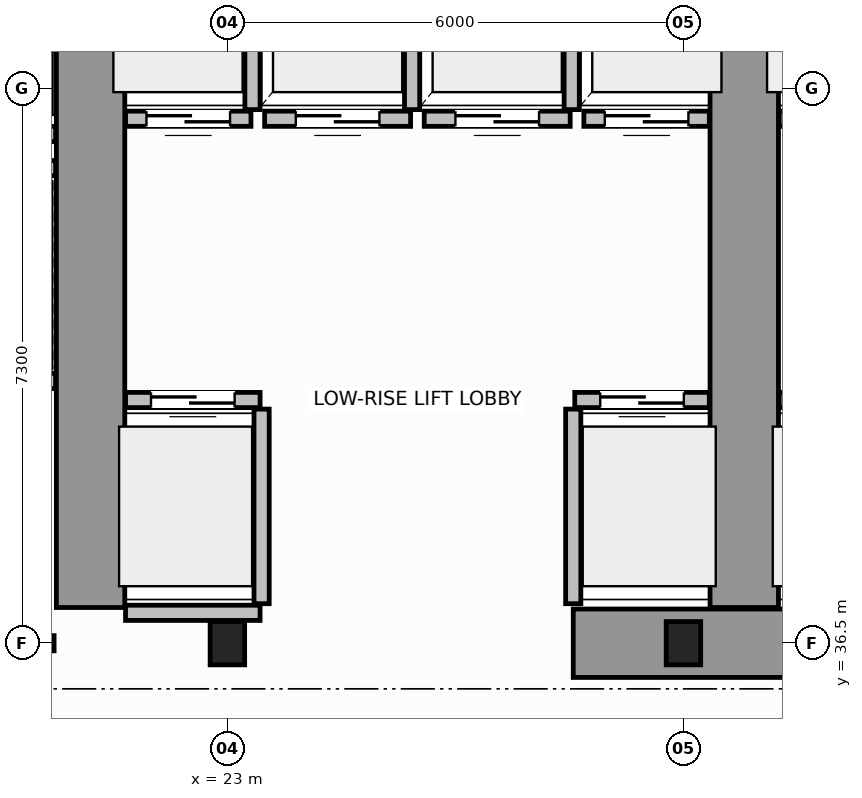
"""IFC4 building model, lengths in metres.
Left out: names, types, materials, properties, quantities, classifications, styles, units other than length and angle.
Written with IfcOpenShell. Run it as: python <this file> out.ifc"""

import sys

from ifc_helpers import new_model, si_unit, direction, frame, frame_2d, origin, origin_2d, place, context, subcontext, project, spatial, rectangle, i_section, extrude, source, transform, mapped, element, fill, save


model = new_model("IFC4")
c1 = context("Model", 3, precision=1e-05, world=origin(), true_north=direction((0.0, 1.0)))
c2 = subcontext(c1, "Body", "Model", "MODEL_VIEW")
j1 = project(units=[si_unit("LENGTHUNIT", "METRE"), si_unit("PLANEANGLEUNIT", "RADIAN")], contexts=[c1])
p1 = place(None, origin())
s1 = spatial("IfcSite", under=j1, at=p1, CompositionType="ELEMENT")
p2 = place(p1, origin())
s2 = spatial("IfcBuilding", under=s1, at=p2, CompositionType="ELEMENT")
p3 = place(p2, origin())
s3 = spatial("IfcBuildingStorey", under=s2, at=p3, CompositionType="ELEMENT", Elevation=0.0)
m1 = source(origin(), c2, "Body", "SweptSolid", [
    extrude(i_section(OverallWidth=0.454, OverallDepth=0.569, WebThickness=0.078, FlangeThickness=0.08, FilletRadius=0.015, at=origin_2d()), origin(), (0.0, 0.0, 1.0), 5.6),
])
for number, where, z_axis, x_axis in (
    (1, (23.0, 36.5, 0.0), (0.0, 0.0, 1.0), (1.0, 0.0, 0.0)),
    (2, (29.0, 36.5, 0.0), (0.0, 0.0, 1.0), (1.0, 0.0, 0.0)),
):
    element("IfcColumn", number, at=place(p3, frame(where, z_axis=z_axis, x_axis=x_axis)), inside=s3, PredefinedType="COLUMN", context=c2, shape_type="MappedRepresentation", body=[
        mapped(m1, transform((0.0, 0.0, 0.0), scale=1.0)),
    ])
p4 = place(p3, frame((27.55, 36.5, 0.0), z_axis=(0.0, 0.0, 1.0), x_axis=(1.0, 0.0, 0.0)))
e3 = element("IfcWall", 3, at=p4, inside=s3, PredefinedType="SHEAR", context=c2, shape_type="SweptSolid", body=[
    extrude(rectangle(XDim=4.5, YDim=0.9, at=frame_2d((2.25, 0.0))), origin(), (0.0, 0.0, 1.0), 5.6),
])
for number, where, z_axis, x_axis in (
    (4, (21.2, 36.97, 0.0), (0.0, 0.0, 1.0), (0.0, 1.0, 0.0)),
    (5, (29.8, 36.97, 0.0), (0.0, 0.0, 1.0), (0.0, 1.0, 0.0)),
):
    element("IfcWall", number, at=place(p3, frame(where, z_axis=z_axis, x_axis=x_axis)), inside=s3, PredefinedType="SHEAR", context=c2, shape_type="SweptSolid", body=[
        extrude(rectangle(XDim=9.23, YDim=0.9, at=frame_2d((4.615, 0.0))), origin(), (0.0, 0.0, 1.0), 5.6),
    ])
p5 = place(p3, frame((18.25, 36.5, 0.0), z_axis=(0.0, 0.0, 1.0), x_axis=(1.0, 0.0, 0.0)))
e6 = element("IfcWall", 6, at=p5, inside=s3, PredefinedType="SOLIDWALL", context=c2, shape_type="SweptSolid", body=[
    extrude(rectangle(XDim=2.47, YDim=0.2, at=frame_2d((1.235, 0.0))), origin(), (0.0, 0.0, 1.0), 4.11),
])
p6 = place(p5, frame((0.65, 0.0, 0.0)))
e7 = element("IfcOpeningElement", 7, at=p6, cuts=e6, PredefinedType="OPENING", context=c2, shape_type="SweptSolid", body=[
    extrude(rectangle(XDim=1.1, YDim=2.15, at=frame_2d((0.55, 1.075))), frame((0.0, 0.11, 0.0), z_axis=(0.0, -1.0, 0.0), x_axis=(1.0, 0.0, 0.0)), (0.0, 0.0, 1.0), 0.22),
])
p7 = place(p3, frame((21.66, 39.7, 0.0), z_axis=(0.0, 0.0, 1.0), x_axis=(1.0, 0.0, 0.0)))
e8 = element("IfcWall", 8, at=p7, inside=s3, PredefinedType="SOLIDWALL", context=c2, shape_type="SweptSolid", body=[
    extrude(rectangle(XDim=1.77, YDim=0.2, at=frame_2d((0.885, 0.0))), origin(), (0.0, 0.0, 1.0), 5.32),
])
p8 = place(p7, frame((0.335, 0.0, 0.0)))
e9 = element("IfcOpeningElement", 9, at=p8, cuts=e8, PredefinedType="OPENING", context=c2, shape_type="SweptSolid", body=[
    extrude(rectangle(XDim=1.1, YDim=2.15, at=frame_2d((0.55, 1.075))), frame((0.0, 0.11, 0.0), z_axis=(0.0, -1.0, 0.0), x_axis=(1.0, 0.0, 0.0)), (0.0, 0.0, 1.0), 0.22),
])
p9 = place(p3, frame((21.66, 36.9, 0.0), z_axis=(0.0, 0.0, 1.0), x_axis=(1.0, 0.0, 0.0)))
e10 = element("IfcWall", 10, at=p9, inside=s3, PredefinedType="SOLIDWALL", context=c2, shape_type="SweptSolid", body=[
    extrude(rectangle(XDim=1.77, YDim=0.2, at=frame_2d((0.885, 0.0))), origin(), (0.0, 0.0, 1.0), 4.11),
])
p10 = place(p3, frame((23.45, 37.02, 0.0), z_axis=(0.0, 0.0, 1.0), x_axis=(0.0, 1.0, 0.0)))
e11 = element("IfcWall", 11, at=p10, inside=s3, PredefinedType="SOLIDWALL", context=c2, shape_type="SweptSolid", body=[
    extrude(rectangle(XDim=2.56, YDim=0.2, at=frame_2d((1.28, 0.0))), origin(), (0.0, 0.0, 1.0), 5.32),
])
p11 = place(p3, frame((27.57, 39.7, 0.0), z_axis=(0.0, 0.0, 1.0), x_axis=(1.0, 0.0, 0.0)))
e12 = element("IfcWall", 12, at=p11, inside=s3, PredefinedType="SOLIDWALL", context=c2, shape_type="SweptSolid", body=[
    extrude(rectangle(XDim=1.77, YDim=0.2, at=frame_2d((0.885, 0.0))), origin(), (0.0, 0.0, 1.0), 5.32),
])
p12 = place(p11, frame((0.335, 0.0, 0.0)))
e13 = element("IfcOpeningElement", 13, at=p12, cuts=e12, PredefinedType="OPENING", context=c2, shape_type="SweptSolid", body=[
    extrude(rectangle(XDim=1.1, YDim=2.15, at=frame_2d((0.55, 1.075))), frame((0.0, 0.11, 0.0), z_axis=(0.0, -1.0, 0.0), x_axis=(1.0, 0.0, 0.0)), (0.0, 0.0, 1.0), 0.22),
])
p13 = place(p3, frame((27.55, 37.02, 0.0), z_axis=(0.0, 0.0, 1.0), x_axis=(0.0, 1.0, 0.0)))
e14 = element("IfcWall", 14, at=p13, inside=s3, PredefinedType="SOLIDWALL", context=c2, shape_type="SweptSolid", body=[
    extrude(rectangle(XDim=2.56, YDim=0.2, at=frame_2d((1.28, 0.0))), origin(), (0.0, 0.0, 1.0), 5.32),
])
p14 = place(p3, frame((21.66, 43.4, 0.0), z_axis=(0.0, 0.0, 1.0), x_axis=(1.0, 0.0, 0.0)))
e15 = element("IfcWall", 15, at=p14, inside=s3, PredefinedType="SOLIDWALL", context=c2, shape_type="SweptSolid", body=[
    extrude(rectangle(XDim=1.65, YDim=0.2, at=frame_2d((0.825, 0.0))), origin(), (0.0, 0.0, 1.0), 5.32),
])
p15 = place(p14, frame((0.275, 0.0, 0.0)))
e16 = element("IfcOpeningElement", 16, at=p15, cuts=e15, PredefinedType="OPENING", context=c2, shape_type="SweptSolid", body=[
    extrude(rectangle(XDim=1.1, YDim=2.15, at=frame_2d((0.55, 1.075))), frame((0.0, 0.11, 0.0), z_axis=(0.0, -1.0, 0.0), x_axis=(1.0, 0.0, 0.0)), (0.0, 0.0, 1.0), 0.22),
])
p16 = place(p3, frame((23.33, 43.52, 0.0), z_axis=(0.0, 0.0, 1.0), x_axis=(0.0, 1.0, 0.0)))
e17 = element("IfcWall", 17, at=p16, inside=s3, PredefinedType="SOLIDWALL", context=c2, shape_type="SweptSolid", body=[
    extrude(rectangle(XDim=2.56, YDim=0.2, at=frame_2d((1.28, 0.0))), origin(), (0.0, 0.0, 1.0), 5.32),
])
p17 = place(p3, frame((23.49, 43.4, 0.0), z_axis=(0.0, 0.0, 1.0), x_axis=(1.0, 0.0, 0.0)))
e18 = element("IfcWall", 18, at=p17, inside=s3, PredefinedType="SOLIDWALL", context=c2, shape_type="SweptSolid", body=[
    extrude(rectangle(XDim=1.92, YDim=0.2, at=frame_2d((0.96, 0.0))), origin(), (0.0, 0.0, 1.0), 5.32),
])
p18 = place(p17, frame((0.41, 0.0, 0.0)))
e19 = element("IfcOpeningElement", 19, at=p18, cuts=e18, PredefinedType="OPENING", context=c2, shape_type="SweptSolid", body=[
    extrude(rectangle(XDim=1.1, YDim=2.15, at=frame_2d((0.55, 1.075))), frame((0.0, 0.11, 0.0), z_axis=(0.0, -1.0, 0.0), x_axis=(1.0, 0.0, 0.0)), (0.0, 0.0, 1.0), 0.22),
])
p19 = place(p3, frame((25.43, 43.52, 0.0), z_axis=(0.0, 0.0, 1.0), x_axis=(0.0, 1.0, 0.0)))
e20 = element("IfcWall", 20, at=p19, inside=s3, PredefinedType="SOLIDWALL", context=c2, shape_type="SweptSolid", body=[
    extrude(rectangle(XDim=2.56, YDim=0.2, at=frame_2d((1.28, 0.0))), origin(), (0.0, 0.0, 1.0), 5.32),
])
p20 = place(p3, frame((25.59, 43.4, 0.0), z_axis=(0.0, 0.0, 1.0), x_axis=(1.0, 0.0, 0.0)))
e21 = element("IfcWall", 21, at=p20, inside=s3, PredefinedType="SOLIDWALL", context=c2, shape_type="SweptSolid", body=[
    extrude(rectangle(XDim=1.92, YDim=0.2, at=frame_2d((0.96, 0.0))), origin(), (0.0, 0.0, 1.0), 5.32),
])
p21 = place(p20, frame((0.41, 0.0, 0.0)))
e22 = element("IfcOpeningElement", 22, at=p21, cuts=e21, PredefinedType="OPENING", context=c2, shape_type="SweptSolid", body=[
    extrude(rectangle(XDim=1.1, YDim=2.15, at=frame_2d((0.55, 1.075))), frame((0.0, 0.11, 0.0), z_axis=(0.0, -1.0, 0.0), x_axis=(1.0, 0.0, 0.0)), (0.0, 0.0, 1.0), 0.22),
])
p22 = place(p3, frame((27.53, 43.52, 0.0), z_axis=(0.0, 0.0, 1.0), x_axis=(0.0, 1.0, 0.0)))
e23 = element("IfcWall", 23, at=p22, inside=s3, PredefinedType="SOLIDWALL", context=c2, shape_type="SweptSolid", body=[
    extrude(rectangle(XDim=2.56, YDim=0.2, at=frame_2d((1.28, 0.0))), origin(), (0.0, 0.0, 1.0), 5.32),
])
p23 = place(p3, frame((27.69, 43.4, 0.0), z_axis=(0.0, 0.0, 1.0), x_axis=(1.0, 0.0, 0.0)))
e24 = element("IfcWall", 24, at=p23, inside=s3, PredefinedType="SOLIDWALL", context=c2, shape_type="SweptSolid", body=[
    extrude(rectangle(XDim=1.65, YDim=0.2, at=frame_2d((0.825, 0.0))), origin(), (0.0, 0.0, 1.0), 5.32),
])
p24 = place(p23, frame((0.275, 0.0, 0.0)))
e25 = element("IfcOpeningElement", 25, at=p24, cuts=e24, PredefinedType="OPENING", context=c2, shape_type="SweptSolid", body=[
    extrude(rectangle(XDim=1.1, YDim=2.15, at=frame_2d((0.55, 1.075))), frame((0.0, 0.11, 0.0), z_axis=(0.0, -1.0, 0.0), x_axis=(1.0, 0.0, 0.0)), (0.0, 0.0, 1.0), 0.22),
])
p25 = place(p3, frame((30.26, 39.7, 0.0), z_axis=(0.0, 0.0, 1.0), x_axis=(1.0, 0.0, 0.0)))
e26 = element("IfcWall", 26, at=p25, inside=s3, PredefinedType="SOLIDWALL", context=c2, shape_type="SweptSolid", body=[
    extrude(rectangle(XDim=1.77, YDim=0.2, at=frame_2d((0.885, 0.0))), origin(), (0.0, 0.0, 1.0), 5.32),
])
p26 = place(p25, frame((0.335, 0.0, 0.0)))
e27 = element("IfcOpeningElement", 27, at=p26, cuts=e26, PredefinedType="OPENING", context=c2, shape_type="SweptSolid", body=[
    extrude(rectangle(XDim=1.1, YDim=2.15, at=frame_2d((0.55, 1.075))), frame((0.0, 0.11, 0.0), z_axis=(0.0, -1.0, 0.0), x_axis=(1.0, 0.0, 0.0)), (0.0, 0.0, 1.0), 0.22),
])
p27 = place(p3, frame((30.26, 43.4, 0.0), z_axis=(0.0, 0.0, 1.0), x_axis=(1.0, 0.0, 0.0)))
e28 = element("IfcWall", 28, at=p27, inside=s3, PredefinedType="SOLIDWALL", context=c2, shape_type="SweptSolid", body=[
    extrude(rectangle(XDim=1.65, YDim=0.2, at=frame_2d((0.825, 0.0))), origin(), (0.0, 0.0, 1.0), 5.32),
])
p28 = place(p27, frame((0.275, 0.0, 0.0)))
e29 = element("IfcOpeningElement", 29, at=p28, cuts=e28, PredefinedType="OPENING", context=c2, shape_type="SweptSolid", body=[
    extrude(rectangle(XDim=1.1, YDim=2.15, at=frame_2d((0.55, 1.075))), frame((0.0, 0.11, 0.0), z_axis=(0.0, -1.0, 0.0), x_axis=(1.0, 0.0, 0.0)), (0.0, 0.0, 1.0), 0.22),
])
p29 = place(p3, frame((18.67, 43.2, 0.0), z_axis=(0.0, 0.0, 1.0), x_axis=(1.0, 0.0, 0.0)))
e30 = element("IfcWall", 30, at=p29, inside=s3, PredefinedType="SOLIDWALL", context=c2, shape_type="SweptSolid", body=[
    extrude(rectangle(XDim=2.07, YDim=0.2, at=frame_2d((1.035, 0.0))), origin(), (0.0, 0.0, 1.0), 5.32),
])
p30 = place(p3, frame((18.67, 39.95, 0.0), z_axis=(0.0, 0.0, 1.0), x_axis=(1.0, 0.0, 0.0)))
e31 = element("IfcWall", 31, at=p30, inside=s3, PredefinedType="SOLIDWALL", context=c2, shape_type="SweptSolid", body=[
    extrude(rectangle(XDim=2.07, YDim=0.2, at=frame_2d((1.035, 0.0))), origin(), (0.0, 0.0, 1.0), 5.32),
])
p31 = place(p30, frame((0.485, 0.0, 0.0)))
e32 = element("IfcOpeningElement", 32, at=p31, cuts=e31, PredefinedType="OPENING", context=c2, shape_type="SweptSolid", body=[
    extrude(rectangle(XDim=1.1, YDim=2.15, at=frame_2d((0.55, 1.075))), frame((0.0, 0.11, 0.0), z_axis=(0.0, -1.0, 0.0), x_axis=(1.0, 0.0, 0.0)), (0.0, 0.0, 1.0), 0.22),
])
p32 = place(p3, frame((18.67, 42.75, 0.0), z_axis=(0.0, 0.0, 1.0), x_axis=(1.0, 0.0, 0.0)))
e33 = element("IfcWall", 33, at=p32, inside=s3, PredefinedType="SOLIDWALL", context=c2, shape_type="SweptSolid", body=[
    extrude(rectangle(XDim=2.07, YDim=0.2, at=frame_2d((1.035, 0.0))), origin(), (0.0, 0.0, 1.0), 5.32),
])
m2 = source(origin(), c2, "Body", "SweptSolid", [
    extrude(rectangle(XDim=1.1, YDim=2.15, at=frame_2d((0.55, 1.075))), frame((0.0, 0.025, 0.0), z_axis=(0.0, -1.0, 0.0), x_axis=(1.0, 0.0, 0.0)), (0.0, 0.0, 1.0), 0.05),
])
p33 = place(p8, origin())
e34 = element("IfcDoor", 34, at=p33, inside=s3, OperationType="DOUBLE_DOOR_SLIDING", PredefinedType="DOOR", context=c2, shape_type="MappedRepresentation", body=[
    mapped(m2, transform((0.0, 0.0, 0.0), scale=1.0)),
])
fill(e9, e34)
p34 = place(p12, origin())
e35 = element("IfcDoor", 35, at=p34, inside=s3, OperationType="DOUBLE_DOOR_SLIDING", PredefinedType="DOOR", context=c2, shape_type="MappedRepresentation", body=[
    mapped(m2, transform((0.0, 0.0, 0.0), scale=1.0)),
])
fill(e13, e35)
p35 = place(p15, origin())
e36 = element("IfcDoor", 36, at=p35, inside=s3, OperationType="DOUBLE_DOOR_SLIDING", PredefinedType="DOOR", context=c2, shape_type="MappedRepresentation", body=[
    mapped(m2, transform((0.0, 0.0, 0.0), scale=1.0)),
])
fill(e16, e36)
p36 = place(p18, origin())
e37 = element("IfcDoor", 37, at=p36, inside=s3, OperationType="DOUBLE_DOOR_SLIDING", PredefinedType="DOOR", context=c2, shape_type="MappedRepresentation", body=[
    mapped(m2, transform((0.0, 0.0, 0.0), scale=1.0)),
])
fill(e19, e37)
p37 = place(p21, origin())
e38 = element("IfcDoor", 38, at=p37, inside=s3, OperationType="DOUBLE_DOOR_SLIDING", PredefinedType="DOOR", context=c2, shape_type="MappedRepresentation", body=[
    mapped(m2, transform((0.0, 0.0, 0.0), scale=1.0)),
])
fill(e22, e38)
p38 = place(p24, origin())
e39 = element("IfcDoor", 39, at=p38, inside=s3, OperationType="DOUBLE_DOOR_SLIDING", PredefinedType="DOOR", context=c2, shape_type="MappedRepresentation", body=[
    mapped(m2, transform((0.0, 0.0, 0.0), scale=1.0)),
])
fill(e25, e39)
save(model, sys.argv[1])
